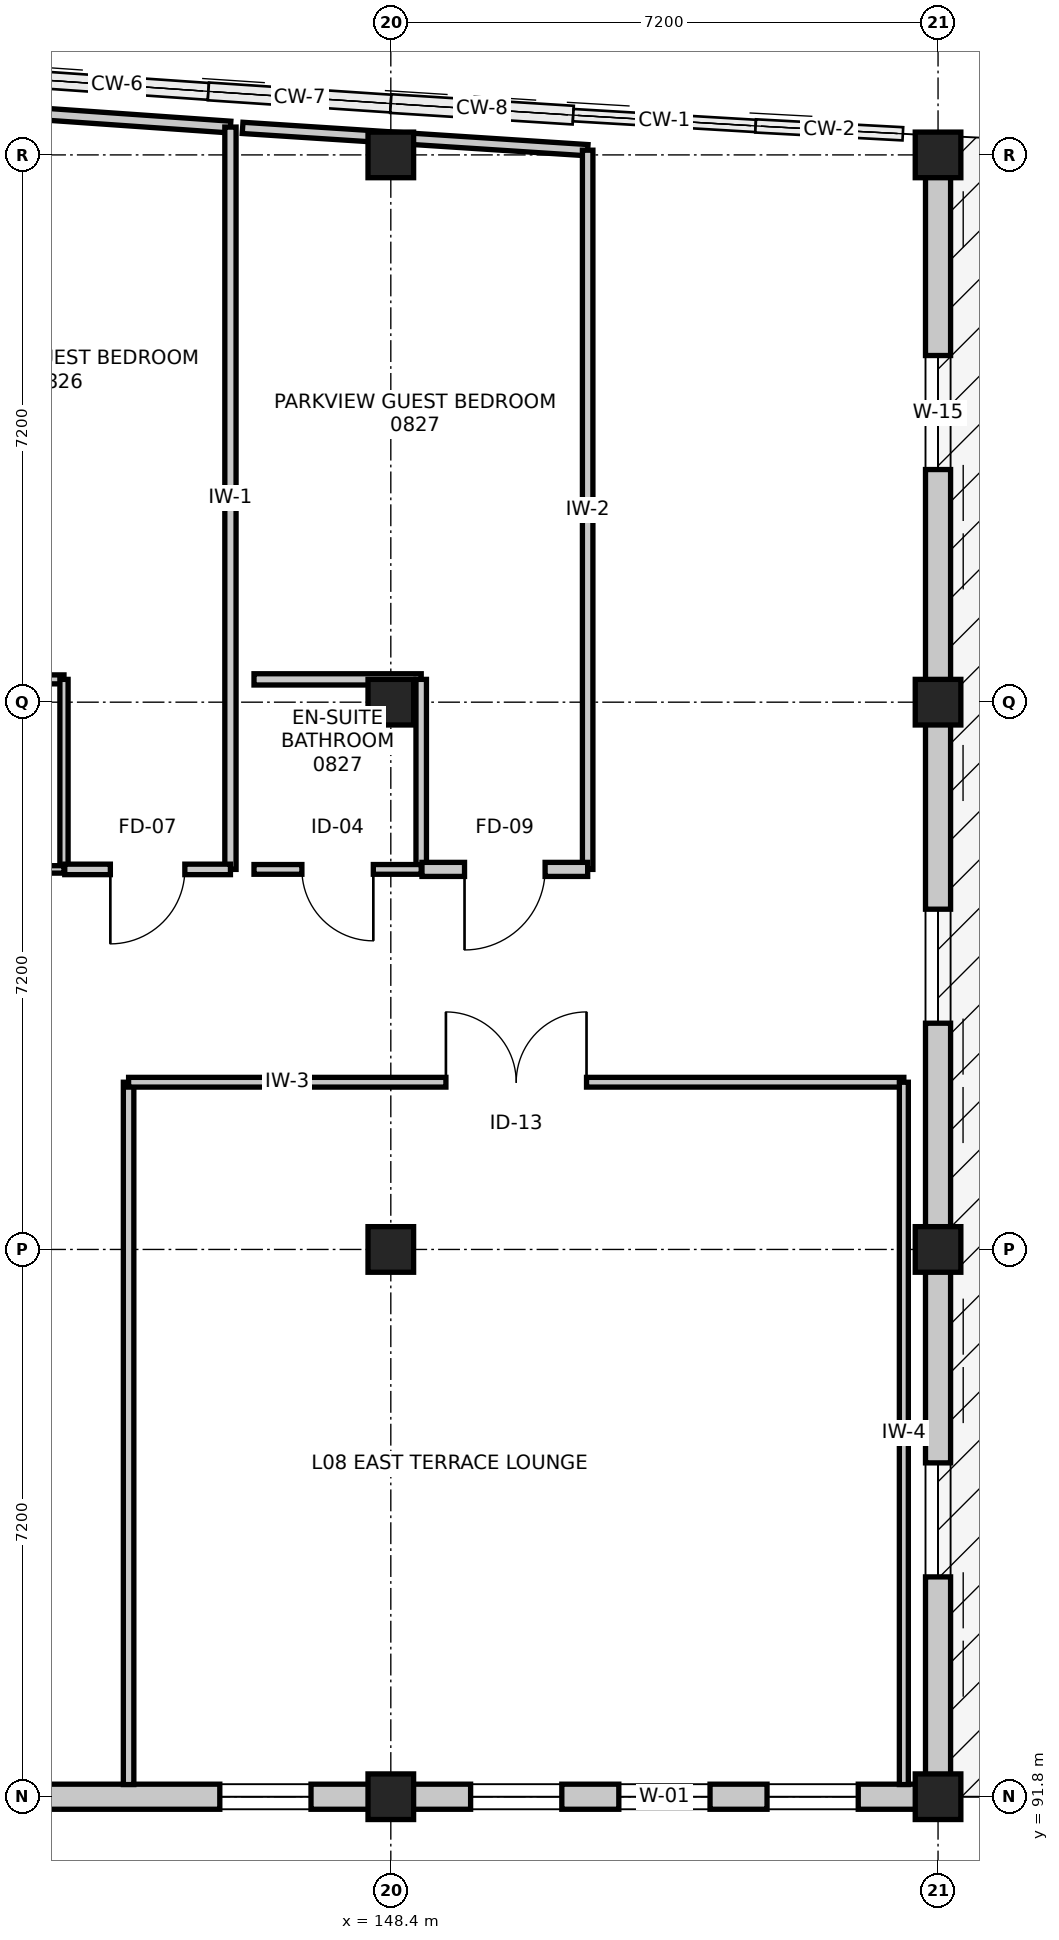
"""IFC4 building model, lengths in metres.
Left out: names, types, materials, properties, quantities, classifications, styles, units other than length and angle.
Written with IfcOpenShell. Run it as: python <this file> out.ifc"""

import sys

from ifc_helpers import new_model, si_unit, direction, frame, frame_2d, origin, origin_2d, place, context, subcontext, project, spatial, rectangle, extrude, element, fill, save


model = new_model("IFC4")
c1 = context("Model", 3, precision=1e-05, world=origin(), true_north=direction((0.0, 1.0)))
c2 = subcontext(c1, "Body", "Model", "MODEL_VIEW")
j1 = project(units=[si_unit("LENGTHUNIT", "METRE"), si_unit("PLANEANGLEUNIT", "RADIAN")], contexts=[c1])
p1 = place(None, origin())
s1 = spatial("IfcSite", under=j1, at=p1, CompositionType="ELEMENT")
p2 = place(p1, origin())
s2 = spatial("IfcBuilding", under=s1, at=p2, CompositionType="ELEMENT")
p3 = place(p2, frame((0.0, 0.0, 33.6)))
s3 = spatial("IfcBuildingStorey", under=s2, at=p3, CompositionType="ELEMENT", Elevation=33.6)
for number, where, z_axis, x_axis in (
    (1, (148.4, 91.8, 0.0), (0.0, 0.0, 1.0), (1.0, 0.0, 0.0)),
    (2, (148.4, 99.0, 0.0), (0.0, 0.0, 1.0), (1.0, 0.0, 0.0)),
    (3, (148.4, 106.2, 0.0), (0.0, 0.0, 1.0), (1.0, 0.0, 0.0)),
    (4, (148.4, 113.4, 0.0), (0.0, 0.0, 1.0), (1.0, 0.0, 0.0)),
):
    element("IfcColumn", number, at=place(p3, frame(where, z_axis=z_axis, x_axis=x_axis)), inside=s3, PredefinedType="COLUMN", context=c2, shape_type="SweptSolid", body=[
        extrude(rectangle(XDim=0.6, YDim=0.6, at=origin_2d()), origin(), (0.0, 0.0, 1.0), 5.2),
    ])
for number, where, z_axis, x_axis in (
    (5, (155.6, 91.8, 0.0), (0.0, 0.0, 1.0), (1.0, 0.0, 0.0)),
    (6, (155.6, 99.0, 0.0), (0.0, 0.0, 1.0), (1.0, 0.0, 0.0)),
    (7, (155.6, 106.2, 0.0), (0.0, 0.0, 1.0), (1.0, 0.0, 0.0)),
    (8, (155.6, 113.4, 0.0), (0.0, 0.0, 1.0), (1.0, 0.0, 0.0)),
):
    element("IfcColumn", number, at=place(p3, frame(where, z_axis=z_axis, x_axis=x_axis)), inside=s3, PredefinedType="COLUMN", context=c2, shape_type="SweptSolid", body=[
        extrude(rectangle(XDim=0.6, YDim=0.6, at=origin_2d()), origin(), (0.0, 0.0, 1.0), 3.6),
    ])
p4 = place(p3, frame((155.6, 113.653, 0.0), z_axis=(0.0, 0.0, 1.0), x_axis=(0.0, -1.0, 0.0)))
e9 = element("IfcWall", 9, at=p4, inside=s3, PredefinedType="STANDARD", context=c2, shape_type="SweptSolid", body=[
    extrude(rectangle(XDim=7.284, YDim=0.33, at=frame_2d((3.642, 0.0))), origin(), (0.0, 0.0, 1.0), 2.695),
])
p5 = place(p4, frame((2.892, 0.0, 0.75)))
e10 = element("IfcOpeningElement", 10, at=p5, cuts=e9, PredefinedType="OPENING", context=c2, shape_type="SweptSolid", body=[
    extrude(rectangle(XDim=1.5, YDim=1.5, at=frame_2d((0.75, 0.75))), frame((0.0, 0.175, 0.0), z_axis=(0.0, -1.0, 0.0), x_axis=(1.0, 0.0, 0.0)), (0.0, 0.0, 1.0), 0.35),
])
p6 = place(p3, frame((155.6, 106.368, 0.0), z_axis=(0.0, 0.0, 1.0), x_axis=(0.0, -1.0, 0.0)))
e11 = element("IfcWall", 11, at=p6, inside=s3, PredefinedType="STANDARD", context=c2, shape_type="SweptSolid", body=[
    extrude(rectangle(XDim=7.284, YDim=0.33, at=frame_2d((3.642, 0.0))), origin(), (0.0, 0.0, 1.0), 2.695),
])
p7 = place(p6, frame((2.892, 0.0, 0.75)))
e12 = element("IfcOpeningElement", 12, at=p7, cuts=e11, PredefinedType="OPENING", context=c2, shape_type="SweptSolid", body=[
    extrude(rectangle(XDim=1.5, YDim=1.5, at=frame_2d((0.75, 0.75))), frame((0.0, 0.175, 0.0), z_axis=(0.0, -1.0, 0.0), x_axis=(1.0, 0.0, 0.0)), (0.0, 0.0, 1.0), 0.35),
])
p8 = place(p3, frame((155.6, 99.084, 0.0), z_axis=(0.0, 0.0, 1.0), x_axis=(0.0, -1.0, 0.0)))
e13 = element("IfcWall", 13, at=p8, inside=s3, PredefinedType="STANDARD", context=c2, shape_type="SweptSolid", body=[
    extrude(rectangle(XDim=7.284, YDim=0.33, at=frame_2d((3.642, 0.0))), origin(), (0.0, 0.0, 1.0), 2.695),
])
p9 = place(p8, frame((2.892, 0.0, 0.75)))
e14 = element("IfcOpeningElement", 14, at=p9, cuts=e13, PredefinedType="OPENING", context=c2, shape_type="SweptSolid", body=[
    extrude(rectangle(XDim=1.5, YDim=1.5, at=frame_2d((0.75, 0.75))), frame((0.0, 0.175, 0.0), z_axis=(0.0, -1.0, 0.0), x_axis=(1.0, 0.0, 0.0)), (0.0, 0.0, 1.0), 0.35),
])
p10 = place(p3, frame((155.6, 91.8, 0.0), z_axis=(0.0, 0.0, 1.0), x_axis=(-1.0, 0.0, 0.0)))
e15 = element("IfcWall", 15, at=p10, inside=s3, PredefinedType="STANDARD", context=c2, shape_type="SweptSolid", body=[
    extrude(rectangle(XDim=7.2, YDim=0.33, at=frame_2d((3.6, 0.0))), origin(), (0.0, 0.0, 1.0), 2.86),
])
p11 = place(p10, frame((3.0, 0.0, 0.75)))
e16 = element("IfcOpeningElement", 16, at=p11, cuts=e15, PredefinedType="OPENING", context=c2, shape_type="SweptSolid", body=[
    extrude(rectangle(XDim=1.2, YDim=1.8, at=frame_2d((0.6, 0.9))), frame((0.0, 0.175, 0.0), z_axis=(0.0, -1.0, 0.0), x_axis=(1.0, 0.0, 0.0)), (0.0, 0.0, 1.0), 0.35),
])
p12 = place(p10, frame((1.05, 0.0, 0.85)))
e17 = element("IfcOpeningElement", 17, at=p12, cuts=e15, PredefinedType="OPENING", context=c2, shape_type="SweptSolid", body=[
    extrude(rectangle(XDim=1.2, YDim=1.8, at=frame_2d((0.6, 0.9))), frame((0.0, 0.175, 0.0), z_axis=(0.0, -1.0, 0.0), x_axis=(1.0, 0.0, 0.0)), (0.0, 0.0, 1.0), 0.35),
])
p13 = place(p10, frame((4.95, 0.0, 0.85)))
e18 = element("IfcOpeningElement", 18, at=p13, cuts=e15, PredefinedType="OPENING", context=c2, shape_type="SweptSolid", body=[
    extrude(rectangle(XDim=1.2, YDim=1.8, at=frame_2d((0.6, 0.9))), frame((0.0, 0.175, 0.0), z_axis=(0.0, -1.0, 0.0), x_axis=(1.0, 0.0, 0.0)), (0.0, 0.0, 1.0), 0.35),
])
p14 = place(p3, frame((148.4, 91.8, 0.0), z_axis=(0.0, 0.0, 1.0), x_axis=(-1.0, 0.0, 0.0)))
e19 = element("IfcWall", 19, at=p14, inside=s3, PredefinedType="STANDARD", context=c2, shape_type="SweptSolid", body=[
    extrude(rectangle(XDim=7.2, YDim=0.33, at=frame_2d((3.6, 0.0))), origin(), (0.0, 0.0, 1.0), 2.86),
])
p15 = place(p14, frame((1.05, 0.0, 0.85)))
e20 = element("IfcOpeningElement", 20, at=p15, cuts=e19, PredefinedType="OPENING", context=c2, shape_type="SweptSolid", body=[
    extrude(rectangle(XDim=1.2, YDim=1.8, at=frame_2d((0.6, 0.9))), frame((0.0, 0.175, 0.0), z_axis=(0.0, -1.0, 0.0), x_axis=(1.0, 0.0, 0.0)), (0.0, 0.0, 1.0), 0.35),
])
p16 = place(p14, frame((4.95, 0.0, 0.85)))
e21 = element("IfcOpeningElement", 21, at=p16, cuts=e19, PredefinedType="OPENING", context=c2, shape_type="SweptSolid", body=[
    extrude(rectangle(XDim=1.2, YDim=1.8, at=frame_2d((0.6, 0.9))), frame((0.0, 0.175, 0.0), z_axis=(0.0, -1.0, 0.0), x_axis=(1.0, 0.0, 0.0)), (0.0, 0.0, 1.0), 0.35),
])
p17 = place(p3, frame((144.95, 91.96, 0.0), z_axis=(0.0, 0.0, 1.0), x_axis=(0.0, 1.0, 0.0)))
e22 = element("IfcWall", 22, at=p17, inside=s3, PredefinedType="PARTITIONING", context=c2, shape_type="SweptSolid", body=[
    extrude(rectangle(XDim=9.24, YDim=0.138, at=frame_2d((4.62, 0.0))), origin(), (0.0, 0.0, 1.0), 3.36),
])
p18 = place(p3, frame((144.95, 101.2, 0.0), z_axis=(0.0, 0.0, 1.0), x_axis=(1.0, 0.0, 0.0)))
e23 = element("IfcWall", 23, at=p18, inside=s3, PredefinedType="PARTITIONING", context=c2, shape_type="SweptSolid", body=[
    extrude(rectangle(XDim=10.2, YDim=0.128, at=frame_2d((5.1, 0.0))), origin(), (0.0, 0.0, 1.0), 2.695),
])
p19 = place(p18, frame((4.175, 0.0, 0.0)))
e24 = element("IfcOpeningElement", 24, at=p19, cuts=e23, PredefinedType="OPENING", context=c2, shape_type="SweptSolid", body=[
    extrude(rectangle(XDim=1.85, YDim=2.3, at=frame_2d((0.925, 1.15))), frame((0.0, 0.074, 0.0), z_axis=(0.0, -1.0, 0.0), x_axis=(1.0, 0.0, 0.0)), (0.0, 0.0, 1.0), 0.148),
])
p20 = place(p3, frame((155.15, 101.2, 0.0), z_axis=(0.0, 0.0, 1.0), x_axis=(0.0, -1.0, 0.0)))
e25 = element("IfcWall", 25, at=p20, inside=s3, PredefinedType="PARTITIONING", context=c2, shape_type="SweptSolid", body=[
    extrude(rectangle(XDim=9.24, YDim=0.118, at=frame_2d((4.62, 0.0))), origin(), (0.0, 0.0, 1.0), 2.86),
])
p21 = place(p3, frame((141.9, 106.5, 0.0), z_axis=(0.0, 0.0, 1.0), x_axis=(1.0, 0.0, 0.0)))
e26 = element("IfcWall", 26, at=p21, inside=s3, PredefinedType="PARTITIONING", context=c2, shape_type="SweptSolid", body=[
    extrude(rectangle(XDim=2.2, YDim=0.118, at=frame_2d((1.1, 0.0))), origin(), (0.0, 0.0, 1.0), 3.36),
])
p22 = place(p21, frame((0.9, 0.0, 0.0)))
e27 = element("IfcOpeningElement", 27, at=p22, cuts=e26, PredefinedType="OPENING", context=c2, shape_type="SweptSolid", body=[
    extrude(rectangle(XDim=0.9, YDim=2.08, at=frame_2d((0.45, 1.04))), frame((0.0, 0.069, 0.0), z_axis=(0.0, -1.0, 0.0), x_axis=(1.0, 0.0, 0.0)), (0.0, 0.0, 1.0), 0.138),
])
p23 = place(p3, frame((144.1, 106.5, 0.0), z_axis=(0.0, 0.0, 1.0), x_axis=(0.0, -1.0, 0.0)))
e28 = element("IfcWall", 28, at=p23, inside=s3, PredefinedType="PARTITIONING", context=c2, shape_type="SweptSolid", body=[
    extrude(rectangle(XDim=2.5, YDim=0.108, at=frame_2d((1.25, 0.0))), origin(), (0.0, 0.0, 1.0), 3.36),
])
p24 = place(p3, frame((144.1, 104.0, 0.0), z_axis=(0.0, 0.0, 1.0), x_axis=(-1.0, 0.0, 0.0)))
e29 = element("IfcWall", 29, at=p24, inside=s3, PredefinedType="PARTITIONING", context=c2, shape_type="SweptSolid", body=[
    extrude(rectangle(XDim=2.2, YDim=0.098, at=frame_2d((1.1, 0.0))), origin(), (0.0, 0.0, 1.0), 3.36),
])
p25 = place(p3, frame((141.75, 114.082, 0.0), z_axis=(0.0, 0.0, 1.0), x_axis=(0.997584014239, -0.069470386021, 0.0)))
e30 = element("IfcWall", 30, at=p25, inside=s3, PredefinedType="PARTITIONING", context=c2, shape_type="SweptSolid", body=[
    extrude(rectangle(XDim=4.551, YDim=0.155, at=frame_2d((2.275, 0.0))), origin(), (0.0, 0.0, 1.0), 3.36),
])
p26 = place(p3, frame((146.29, 113.766, 0.0), z_axis=(0.0, 0.0, 1.0), x_axis=(0.0, -1.0, 0.0)))
e31 = element("IfcWall", 31, at=p26, inside=s3, PredefinedType="PARTITIONING", context=c2, shape_type="SweptSolid", body=[
    extrude(rectangle(XDim=9.766, YDim=0.148, at=frame_2d((4.883, 0.0))), origin(), (0.0, 0.0, 1.0), 3.36),
])
p27 = place(p3, frame((146.29, 104.0, 0.0), z_axis=(0.0, 0.0, 1.0), x_axis=(-1.0, 0.0, 0.0)))
e32 = element("IfcWall", 32, at=p27, inside=s3, PredefinedType="PARTITIONING", context=c2, shape_type="SweptSolid", body=[
    extrude(rectangle(XDim=2.18, YDim=0.138, at=frame_2d((1.09, 0.0))), origin(), (0.0, 0.0, 1.0), 3.36),
])
p28 = place(p27, frame((0.6, 0.0, 0.0)))
e33 = element("IfcOpeningElement", 33, at=p28, cuts=e32, PredefinedType="OPENING", context=c2, shape_type="SweptSolid", body=[
    extrude(rectangle(XDim=0.98, YDim=2.15, at=frame_2d((0.49, 1.075))), frame((0.0, 0.079, 0.0), z_axis=(0.0, -1.0, 0.0), x_axis=(1.0, 0.0, 0.0)), (0.0, 0.0, 1.0), 0.158),
])
p29 = place(p3, frame((146.6, 106.5, 0.0), z_axis=(0.0, 0.0, 1.0), x_axis=(1.0, 0.0, 0.0)))
e34 = element("IfcWall", 34, at=p29, inside=s3, PredefinedType="PARTITIONING", context=c2, shape_type="SweptSolid", body=[
    extrude(rectangle(XDim=2.2, YDim=0.148, at=frame_2d((1.1, 0.0))), origin(), (0.0, 0.0, 1.0), 2.695),
])
p30 = place(p3, frame((148.8, 106.5, 0.0), z_axis=(0.0, 0.0, 1.0), x_axis=(0.0, -1.0, 0.0)))
e35 = element("IfcWall", 35, at=p30, inside=s3, PredefinedType="PARTITIONING", context=c2, shape_type="SweptSolid", body=[
    extrude(rectangle(XDim=2.5, YDim=0.138, at=frame_2d((1.25, 0.0))), origin(), (0.0, 0.0, 1.0), 2.86),
])
p31 = place(p3, frame((148.8, 104.0, 0.0), z_axis=(0.0, 0.0, 1.0), x_axis=(-1.0, 0.0, 0.0)))
e36 = element("IfcWall", 36, at=p31, inside=s3, PredefinedType="PARTITIONING", context=c2, shape_type="SweptSolid", body=[
    extrude(rectangle(XDim=2.2, YDim=0.128, at=frame_2d((1.1, 0.0))), origin(), (0.0, 0.0, 1.0), 2.695),
])
p32 = place(p31, frame((0.63, 0.0, 0.0)))
e37 = element("IfcOpeningElement", 37, at=p32, cuts=e36, PredefinedType="OPENING", context=c2, shape_type="SweptSolid", body=[
    extrude(rectangle(XDim=0.94, YDim=2.12, at=frame_2d((0.47, 1.06))), frame((0.0, 0.074, 0.0), z_axis=(0.0, -1.0, 0.0), x_axis=(1.0, 0.0, 0.0)), (0.0, 0.0, 1.0), 0.148),
])
p33 = place(p3, frame((146.45, 113.755, 0.0), z_axis=(0.0, 0.0, 1.0), x_axis=(0.997917516364, -0.06450294981, 0.0)))
e38 = element("IfcWall", 38, at=p33, inside=s3, PredefinedType="PARTITIONING", context=c2, shape_type="SweptSolid", body=[
    extrude(rectangle(XDim=4.55, YDim=0.148, at=frame_2d((2.275, 0.0))), origin(), (0.0, 0.0, 1.0), 2.86),
])
p34 = place(p3, frame((150.99, 113.462, 0.0), z_axis=(0.0, 0.0, 1.0), x_axis=(0.0, -1.0, 0.0)))
e39 = element("IfcWall", 39, at=p34, inside=s3, PredefinedType="PARTITIONING", context=c2, shape_type="SweptSolid", body=[
    extrude(rectangle(XDim=9.462, YDim=0.138, at=frame_2d((4.731, 0.0))), origin(), (0.0, 0.0, 1.0), 2.86),
])
p35 = place(p3, frame((150.99, 104.0, 0.0), z_axis=(0.0, 0.0, 1.0), x_axis=(-1.0, 0.0, 0.0)))
e40 = element("IfcWall", 40, at=p35, inside=s3, PredefinedType="PARTITIONING", context=c2, shape_type="SweptSolid", body=[
    extrude(rectangle(XDim=2.18, YDim=0.185, at=frame_2d((1.09, 0.0))), origin(), (0.0, 0.0, 1.0), 3.36),
])
p36 = place(p35, frame((0.56, 0.0, 0.0)))
e41 = element("IfcOpeningElement", 41, at=p36, cuts=e40, PredefinedType="OPENING", context=c2, shape_type="SweptSolid", body=[
    extrude(rectangle(XDim=1.06, YDim=2.2, at=frame_2d((0.53, 1.1))), frame((0.0, 0.103, 0.0), z_axis=(0.0, -1.0, 0.0), x_axis=(1.0, 0.0, 0.0)), (0.0, 0.0, 1.0), 0.205),
])
p37 = place(p5, origin())
e42 = element("IfcWindow", 42, at=p37, inside=s3, PartitioningType="SINGLE_PANEL", PredefinedType="WINDOW", context=c2, shape_type="SweptSolid", body=[
    extrude(rectangle(XDim=1.5, YDim=1.5, at=frame_2d((0.75, 0.75))), frame((0.0, 0.03, 0.0), z_axis=(0.0, -1.0, 0.0), x_axis=(1.0, 0.0, 0.0)), (0.0, 0.0, 1.0), 0.06),
])
fill(e10, e42)
p38 = place(p7, origin())
e43 = element("IfcWindow", 43, at=p38, inside=s3, PartitioningType="SINGLE_PANEL", PredefinedType="WINDOW", context=c2, shape_type="SweptSolid", body=[
    extrude(rectangle(XDim=1.5, YDim=1.5, at=frame_2d((0.75, 0.75))), frame((0.0, 0.03, 0.0), z_axis=(0.0, -1.0, 0.0), x_axis=(1.0, 0.0, 0.0)), (0.0, 0.0, 1.0), 0.06),
])
fill(e12, e43)
p39 = place(p9, origin())
e44 = element("IfcWindow", 44, at=p39, inside=s3, PartitioningType="SINGLE_PANEL", PredefinedType="WINDOW", context=c2, shape_type="SweptSolid", body=[
    extrude(rectangle(XDim=1.5, YDim=1.5, at=frame_2d((0.75, 0.75))), frame((0.0, 0.03, 0.0), z_axis=(0.0, -1.0, 0.0), x_axis=(1.0, 0.0, 0.0)), (0.0, 0.0, 1.0), 0.06),
])
fill(e14, e44)
p40 = place(p11, origin())
e45 = element("IfcWindow", 45, at=p40, inside=s3, PartitioningType="SINGLE_PANEL", PredefinedType="WINDOW", context=c2, shape_type="SweptSolid", body=[
    extrude(rectangle(XDim=1.2, YDim=1.8, at=frame_2d((0.6, 0.9))), frame((0.0, 0.03, 0.0), z_axis=(0.0, -1.0, 0.0), x_axis=(1.0, 0.0, 0.0)), (0.0, 0.0, 1.0), 0.06),
])
fill(e16, e45)
p41 = place(p12, origin())
e46 = element("IfcWindow", 46, at=p41, inside=s3, PartitioningType="SINGLE_PANEL", PredefinedType="WINDOW", context=c2, shape_type="SweptSolid", body=[
    extrude(rectangle(XDim=1.2, YDim=1.8, at=frame_2d((0.6, 0.9))), frame((0.0, 0.03, 0.0), z_axis=(0.0, -1.0, 0.0), x_axis=(1.0, 0.0, 0.0)), (0.0, 0.0, 1.0), 0.06),
])
fill(e17, e46)
p42 = place(p13, origin())
e47 = element("IfcWindow", 47, at=p42, inside=s3, PartitioningType="SINGLE_PANEL", PredefinedType="WINDOW", context=c2, shape_type="SweptSolid", body=[
    extrude(rectangle(XDim=1.2, YDim=1.8, at=frame_2d((0.6, 0.9))), frame((0.0, 0.03, 0.0), z_axis=(0.0, -1.0, 0.0), x_axis=(1.0, 0.0, 0.0)), (0.0, 0.0, 1.0), 0.06),
])
fill(e18, e47)
p43 = place(p15, origin())
e48 = element("IfcWindow", 48, at=p43, inside=s3, PartitioningType="SINGLE_PANEL", PredefinedType="WINDOW", context=c2, shape_type="SweptSolid", body=[
    extrude(rectangle(XDim=1.2, YDim=1.8, at=frame_2d((0.6, 0.9))), frame((0.0, 0.03, 0.0), z_axis=(0.0, -1.0, 0.0), x_axis=(1.0, 0.0, 0.0)), (0.0, 0.0, 1.0), 0.06),
])
fill(e20, e48)
p44 = place(p19, origin())
e49 = element("IfcDoor", 49, at=p44, inside=s3, OperationType="DOUBLE_DOOR_SINGLE_SWING", PredefinedType="DOOR", context=c2, shape_type="SweptSolid", body=[
    extrude(rectangle(XDim=1.85, YDim=2.3, at=frame_2d((0.925, 1.15))), frame((0.0, 0.025, 0.0), z_axis=(0.0, -1.0, 0.0), x_axis=(1.0, 0.0, 0.0)), (0.0, 0.0, 1.0), 0.05),
])
fill(e24, e49)
p45 = place(p28, origin())
e50 = element("IfcDoor", 50, at=p45, inside=s3, OperationType="SINGLE_SWING_RIGHT", PredefinedType="DOOR", context=c2, shape_type="SweptSolid", body=[
    extrude(rectangle(XDim=0.98, YDim=2.15, at=frame_2d((0.49, 1.075))), frame((0.0, 0.025, 0.0), z_axis=(0.0, -1.0, 0.0), x_axis=(1.0, 0.0, 0.0)), (0.0, 0.0, 1.0), 0.05),
])
fill(e33, e50)
p46 = place(p32, origin())
e51 = element("IfcDoor", 51, at=p46, inside=s3, OperationType="SINGLE_SWING_LEFT", PredefinedType="DOOR", context=c2, shape_type="SweptSolid", body=[
    extrude(rectangle(XDim=0.94, YDim=2.12, at=frame_2d((0.47, 1.06))), frame((0.0, 0.025, 0.0), z_axis=(0.0, -1.0, 0.0), x_axis=(1.0, 0.0, 0.0)), (0.0, 0.0, 1.0), 0.05),
])
fill(e37, e51)
p47 = place(p36, origin())
e52 = element("IfcDoor", 52, at=p47, inside=s3, OperationType="SINGLE_SWING_RIGHT", PredefinedType="DOOR", context=c2, shape_type="SweptSolid", body=[
    extrude(rectangle(XDim=1.06, YDim=2.2, at=frame_2d((0.53, 1.1))), frame((0.0, 0.025, 0.0), z_axis=(0.0, -1.0, 0.0), x_axis=(1.0, 0.0, 0.0)), (0.0, 0.0, 1.0), 0.05),
])
fill(e41, e52)
save(model, sys.argv[1])
